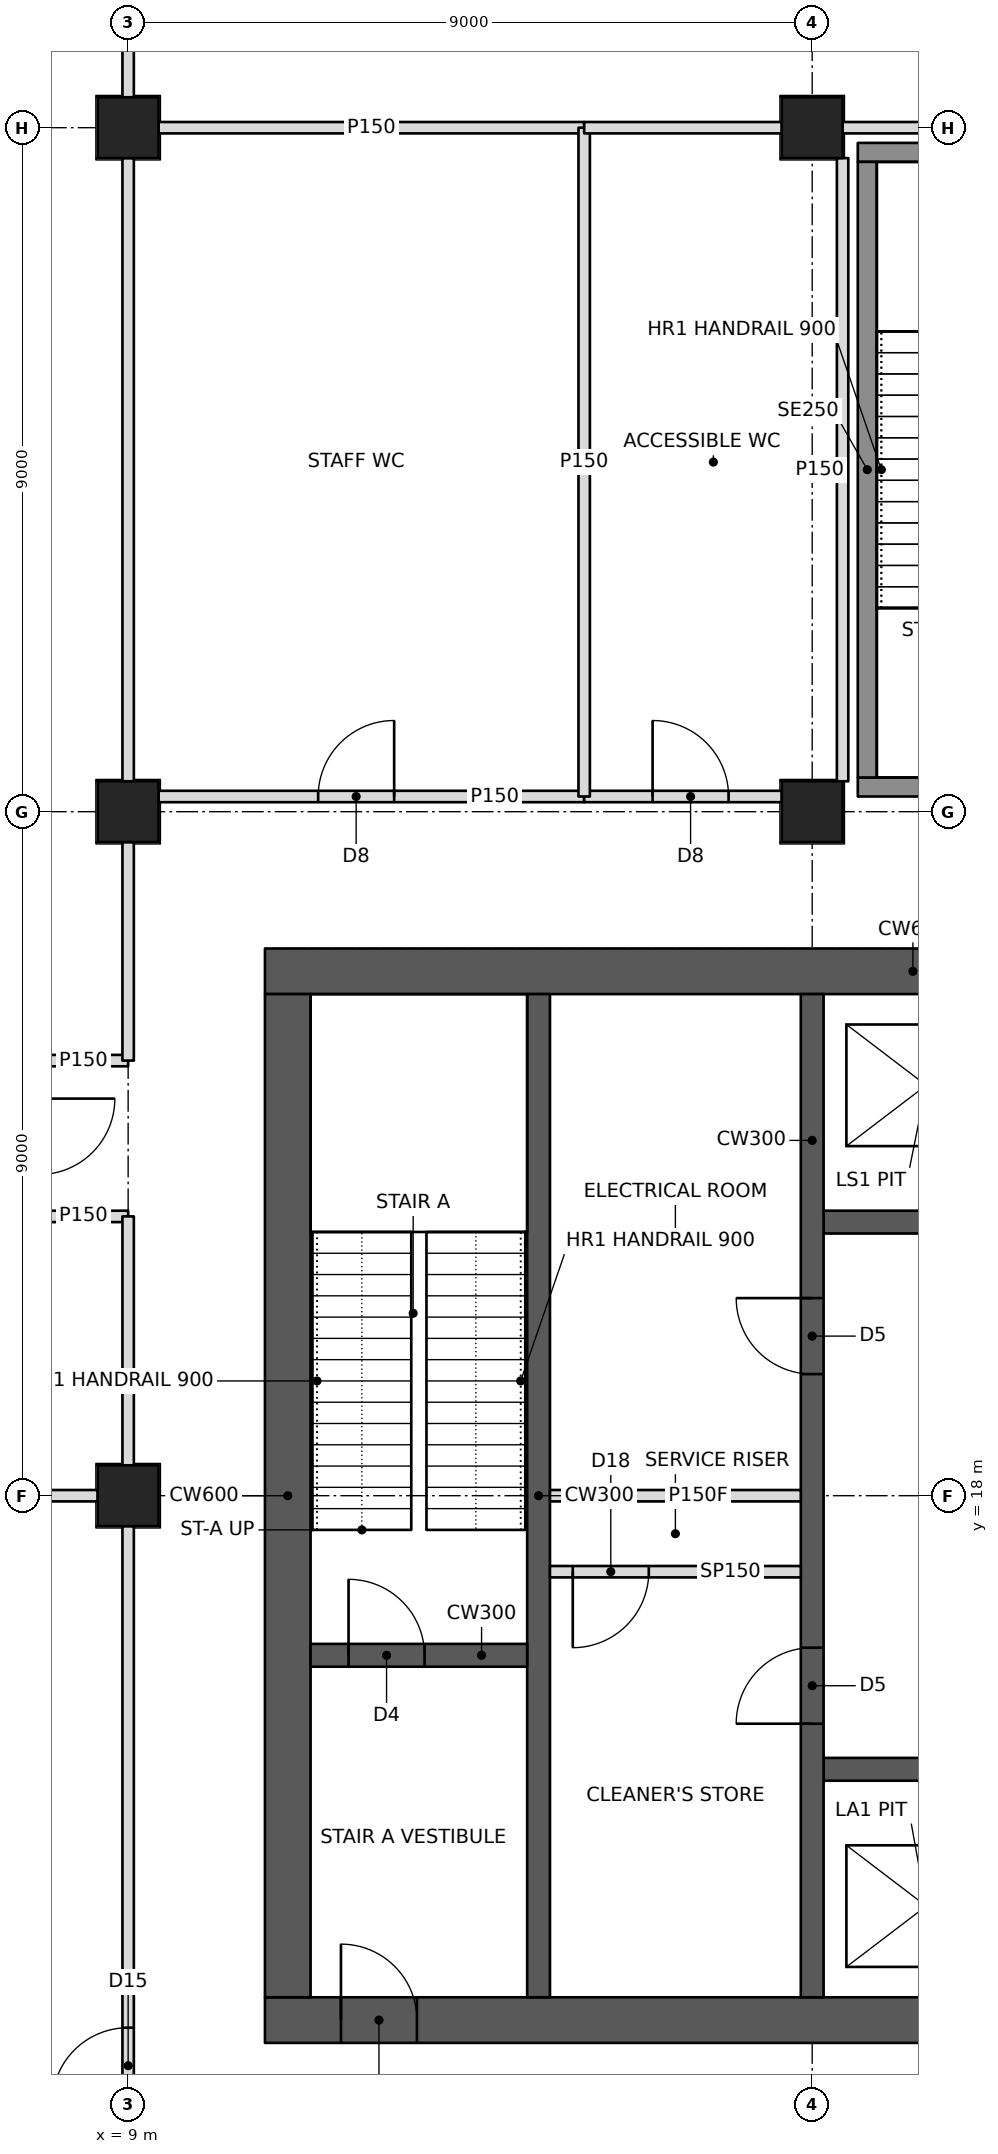
"""IFC4 building model, lengths in metres.
Left out: names, types, materials, properties, quantities, classifications, styles, units other than length and angle.
Written with IfcOpenShell. Run it as: python <this file> out.ifc"""

import sys

from ifc_helpers import new_model, si_unit, direction, frame, frame_2d, origin, origin_2d, place, context, subcontext, project, spatial, rectangle, hollow_rectangle, extrude, element, fill, save


model = new_model("IFC4")
c1 = context("Model", 3, precision=1e-05, world=origin(), true_north=direction((0.0, 1.0)))
c2 = subcontext(c1, "Body", "Model", "MODEL_VIEW")
j1 = project(units=[si_unit("LENGTHUNIT", "METRE"), si_unit("PLANEANGLEUNIT", "RADIAN")], contexts=[c1])
p1 = place(None, origin())
s1 = spatial("IfcSite", under=j1, at=p1, CompositionType="ELEMENT")
p2 = place(p1, origin())
s2 = spatial("IfcBuilding", under=s1, at=p2, CompositionType="ELEMENT")
p3 = place(p2, frame((0.0, 0.0, -10.5)))
s3 = spatial("IfcBuildingStorey", under=s2, at=p3, CompositionType="ELEMENT", Elevation=-10.5)
for number, where, z_axis, x_axis in (
    (1, (9.0, 18.0, -0.5), (0.0, 0.0, 1.0), (1.0, 0.0, 0.0)),
    (2, (9.0, 27.0, -0.5), (0.0, 0.0, 1.0), (1.0, 0.0, 0.0)),
    (3, (9.0, 36.0, -0.5), (0.0, 0.0, 1.0), (1.0, 0.0, 0.0)),
    (4, (18.0, 27.0, -0.5), (0.0, 0.0, 1.0), (1.0, 0.0, 0.0)),
    (5, (18.0, 36.0, -0.5), (0.0, 0.0, 1.0), (1.0, 0.0, 0.0)),
):
    element("IfcColumn", number, at=place(p3, frame(where, z_axis=z_axis, x_axis=x_axis)), inside=s3, PredefinedType="COLUMN", context=c2, shape_type="SweptSolid", body=[
        extrude(hollow_rectangle(XDim=0.8, YDim=0.8, WallThickness=0.1, at=origin_2d()), origin(), (0.0, 0.0, 1.0), 5.5),
    ])
p4 = place(p3, frame((10.8, 11.1, -0.5), z_axis=(0.0, 0.0, 1.0), x_axis=(1.0, 0.0, 0.0)))
e6 = element("IfcWall", 6, at=p4, inside=s3, PredefinedType="SHEAR", context=c2, shape_type="SweptSolid", body=[
    extrude(rectangle(XDim=23.4, YDim=0.6, at=frame_2d((11.7, 0.0))), origin(), (0.0, 0.0, 1.0), 5.5),
])
p5 = place(p4, frame((1.0, 0.0, 0.5)))
e7 = element("IfcOpeningElement", 7, at=p5, cuts=e6, PredefinedType="OPENING", context=c2, shape_type="SweptSolid", body=[
    extrude(rectangle(XDim=1.0, YDim=2.1, at=frame_2d((0.5, 1.05))), frame((0.0, 0.31, 0.0), z_axis=(0.0, -1.0, 0.0), x_axis=(1.0, 0.0, 0.0)), (0.0, 0.0, 1.0), 0.62),
])
p6 = place(p4, frame((17.2, 0.0, 0.5)))
e8 = element("IfcOpeningElement", 8, at=p6, cuts=e6, PredefinedType="OPENING", context=c2, shape_type="SweptSolid", body=[
    extrude(rectangle(XDim=1.8, YDim=2.1, at=frame_2d((0.9, 1.05))), frame((0.0, 0.31, 0.0), z_axis=(0.0, -1.0, 0.0), x_axis=(1.0, 0.0, 0.0)), (0.0, 0.0, 1.0), 0.62),
])
p7 = place(p3, frame((10.8, 24.9, -0.5), z_axis=(0.0, 0.0, 1.0), x_axis=(1.0, 0.0, 0.0)))
e9 = element("IfcWall", 9, at=p7, inside=s3, PredefinedType="SHEAR", context=c2, shape_type="SweptSolid", body=[
    extrude(rectangle(XDim=23.4, YDim=0.6, at=frame_2d((11.7, 0.0))), origin(), (0.0, 0.0, 1.0), 5.5),
])
p8 = place(p7, frame((17.2, 0.0, 0.5)))
e10 = element("IfcOpeningElement", 10, at=p8, cuts=e9, PredefinedType="OPENING", context=c2, shape_type="SweptSolid", body=[
    extrude(rectangle(XDim=1.8, YDim=2.1, at=frame_2d((0.9, 1.05))), frame((0.0, 0.31, 0.0), z_axis=(0.0, -1.0, 0.0), x_axis=(1.0, 0.0, 0.0)), (0.0, 0.0, 1.0), 0.62),
])
p9 = place(p7, frame((21.1, 0.0, 0.5)))
e11 = element("IfcOpeningElement", 11, at=p9, cuts=e9, PredefinedType="OPENING", context=c2, shape_type="SweptSolid", body=[
    extrude(rectangle(XDim=1.0, YDim=2.1, at=frame_2d((0.5, 1.05))), frame((0.0, 0.31, 0.0), z_axis=(0.0, -1.0, 0.0), x_axis=(1.0, 0.0, 0.0)), (0.0, 0.0, 1.0), 0.62),
])
p10 = place(p3, frame((11.1, 11.4, -0.5), z_axis=(0.0, 0.0, 1.0), x_axis=(0.0, 1.0, 0.0)))
e12 = element("IfcWall", 12, at=p10, inside=s3, PredefinedType="SHEAR", context=c2, shape_type="SweptSolid", body=[
    extrude(rectangle(XDim=13.2, YDim=0.6, at=frame_2d((6.6, 0.0))), origin(), (0.0, 0.0, 1.0), 5.5),
])
p11 = place(p3, frame((14.4, 11.4, -0.5), z_axis=(0.0, 0.0, 1.0), x_axis=(0.0, 1.0, 0.0)))
e13 = element("IfcWall", 13, at=p11, inside=s3, PredefinedType="SHEAR", context=c2, shape_type="SweptSolid", body=[
    extrude(rectangle(XDim=13.2, YDim=0.3, at=frame_2d((6.6, 0.0))), origin(), (0.0, 0.0, 1.0), 5.5),
])
p12 = place(p3, frame((11.4, 15.9, -0.5), z_axis=(0.0, 0.0, 1.0), x_axis=(1.0, 0.0, 0.0)))
e14 = element("IfcWall", 14, at=p12, inside=s3, PredefinedType="SHEAR", context=c2, shape_type="SweptSolid", body=[
    extrude(rectangle(XDim=2.85, YDim=0.3, at=frame_2d((1.425, 0.0))), origin(), (0.0, 0.0, 1.0), 5.5),
])
p13 = place(p12, frame((0.5, 0.0, 0.5)))
e15 = element("IfcOpeningElement", 15, at=p13, cuts=e14, PredefinedType="OPENING", context=c2, shape_type="SweptSolid", body=[
    extrude(rectangle(XDim=1.0, YDim=2.1, at=frame_2d((0.5, 1.05))), frame((0.0, 0.16, 0.0), z_axis=(0.0, -1.0, 0.0), x_axis=(1.0, 0.0, 0.0)), (0.0, 0.0, 1.0), 0.32),
])
p14 = place(p3, frame((18.0, 11.4, -0.5), z_axis=(0.0, 0.0, 1.0), x_axis=(0.0, 1.0, 0.0)))
e16 = element("IfcWall", 16, at=p14, inside=s3, PredefinedType="SHEAR", context=c2, shape_type="SweptSolid", body=[
    extrude(rectangle(XDim=13.2, YDim=0.3, at=frame_2d((6.6, 0.0))), origin(), (0.0, 0.0, 1.0), 5.5),
])
p15 = place(p14, frame((3.6, 0.0, 0.5)))
e17 = element("IfcOpeningElement", 17, at=p15, cuts=e16, PredefinedType="OPENING", context=c2, shape_type="SweptSolid", body=[
    extrude(rectangle(XDim=1.0, YDim=2.1, at=frame_2d((0.5, 1.05))), frame((0.0, 0.16, 0.0), z_axis=(0.0, -1.0, 0.0), x_axis=(1.0, 0.0, 0.0)), (0.0, 0.0, 1.0), 0.32),
])
p16 = place(p14, frame((8.2, 0.0, 0.5)))
e18 = element("IfcOpeningElement", 18, at=p16, cuts=e16, PredefinedType="OPENING", context=c2, shape_type="SweptSolid", body=[
    extrude(rectangle(XDim=1.0, YDim=2.1, at=frame_2d((0.5, 1.05))), frame((0.0, 0.16, 0.0), z_axis=(0.0, -1.0, 0.0), x_axis=(1.0, 0.0, 0.0)), (0.0, 0.0, 1.0), 0.32),
])
p17 = place(p3, frame((14.55, 18.0, 0.0), z_axis=(0.0, 0.0, 1.0), x_axis=(1.0, 0.0, 0.0)))
e19 = element("IfcWall", 19, at=p17, inside=s3, PredefinedType="PARTITIONING", context=c2, shape_type="SweptSolid", body=[
    extrude(rectangle(XDim=3.3, YDim=0.15, at=frame_2d((1.65, 0.0))), origin(), (0.0, 0.0, 1.0), 4.7),
])
p18 = place(p3, frame((18.15, 14.4, -0.5), z_axis=(0.0, 0.0, 1.0), x_axis=(1.0, 0.0, 0.0)))
e20 = element("IfcWall", 20, at=p18, inside=s3, PredefinedType="SHEAR", context=c2, shape_type="SweptSolid", body=[
    extrude(rectangle(XDim=9.0, YDim=0.3, at=frame_2d((4.5, 0.0))), origin(), (0.0, 0.0, 1.0), 5.5),
])
p19 = place(p18, frame((6.75, 0.0, 0.5)))
e21 = element("IfcOpeningElement", 21, at=p19, cuts=e20, PredefinedType="OPENING", context=c2, shape_type="SweptSolid", body=[
    extrude(rectangle(XDim=1.2, YDim=2.1, at=frame_2d((0.6, 1.05))), frame((0.0, 0.16, 0.0), z_axis=(0.0, -1.0, 0.0), x_axis=(1.0, 0.0, 0.0)), (0.0, 0.0, 1.0), 0.32),
])
p20 = place(p3, frame((18.15, 21.6, -0.5), z_axis=(0.0, 0.0, 1.0), x_axis=(1.0, 0.0, 0.0)))
e22 = element("IfcWall", 22, at=p20, inside=s3, PredefinedType="SHEAR", context=c2, shape_type="SweptSolid", body=[
    extrude(rectangle(XDim=9.0, YDim=0.3, at=frame_2d((4.5, 0.0))), origin(), (0.0, 0.0, 1.0), 5.5),
])
p21 = place(p20, frame((6.75, 0.0, 0.5)))
e23 = element("IfcOpeningElement", 23, at=p21, cuts=e22, PredefinedType="OPENING", context=c2, shape_type="SweptSolid", body=[
    extrude(rectangle(XDim=1.2, YDim=2.1, at=frame_2d((0.6, 1.05))), frame((0.0, 0.16, 0.0), z_axis=(0.0, -1.0, 0.0), x_axis=(1.0, 0.0, 0.0)), (0.0, 0.0, 1.0), 0.32),
])
p22 = place(p3, frame((0.4, 18.0, 0.0), z_axis=(0.0, 0.0, 1.0), x_axis=(1.0, 0.0, 0.0)))
e24 = element("IfcWall", 24, at=p22, inside=s3, PredefinedType="PARTITIONING", context=c2, shape_type="SweptSolid", body=[
    extrude(rectangle(XDim=8.2, YDim=0.15, at=frame_2d((4.1, 0.0))), origin(), (0.0, 0.0, 1.0), 3.842),
])
p23 = place(p3, frame((9.0, 17.6, 0.0), z_axis=(0.0, 0.0, 1.0), x_axis=(0.0, -1.0, 0.0)))
e25 = element("IfcWall", 25, at=p23, inside=s3, PredefinedType="PARTITIONING", context=c2, shape_type="SweptSolid", body=[
    extrude(rectangle(XDim=8.2, YDim=0.15, at=frame_2d((4.1, 0.0))), origin(), (0.0, 0.0, 1.0), 3.842),
])
p24 = place(p23, frame((6.6, 0.0, 0.0)))
e26 = element("IfcOpeningElement", 26, at=p24, cuts=e25, PredefinedType="OPENING", context=c2, shape_type="SweptSolid", body=[
    extrude(rectangle(XDim=1.0, YDim=2.1, at=frame_2d((0.5, 1.05))), frame((0.0, 0.085, 0.0), z_axis=(0.0, -1.0, 0.0), x_axis=(1.0, 0.0, 0.0)), (0.0, 0.0, 1.0), 0.17),
])
p25 = place(p3, frame((9.0, 26.6, 0.0), z_axis=(0.0, 0.0, 1.0), x_axis=(0.0, -1.0, 0.0)))
e27 = element("IfcWall", 27, at=p25, inside=s3, PredefinedType="PARTITIONING", context=c2, shape_type="SweptSolid", body=[
    extrude(rectangle(XDim=2.875, YDim=0.15, at=frame_2d((1.438, 0.0))), origin(), (0.0, 0.0, 1.0), 3.842),
])
p26 = place(p3, frame((15.0, 27.2, 0.0), z_axis=(0.0, 0.0, 1.0), x_axis=(-1.0, 0.0, 0.0)))
e28 = element("IfcWall", 28, at=p26, inside=s3, PredefinedType="PARTITIONING", context=c2, shape_type="SweptSolid", body=[
    extrude(rectangle(XDim=5.6, YDim=0.15, at=frame_2d((2.8, 0.0))), origin(), (0.0, 0.0, 1.0), 3.842),
])
p27 = place(p26, frame((2.5, 0.0, 0.0)))
e29 = element("IfcOpeningElement", 29, at=p27, cuts=e28, PredefinedType="OPENING", context=c2, shape_type="SweptSolid", body=[
    extrude(rectangle(XDim=1.0, YDim=2.1, at=frame_2d((0.5, 1.05))), frame((0.0, 0.085, 0.0), z_axis=(0.0, -1.0, 0.0), x_axis=(1.0, 0.0, 0.0)), (0.0, 0.0, 1.0), 0.17),
])
p28 = place(p3, frame((9.0, 35.6, 0.0), z_axis=(0.0, 0.0, 1.0), x_axis=(0.0, -1.0, 0.0)))
e30 = element("IfcWall", 30, at=p28, inside=s3, PredefinedType="PARTITIONING", context=c2, shape_type="SweptSolid", body=[
    extrude(rectangle(XDim=8.2, YDim=0.15, at=frame_2d((4.1, 0.0))), origin(), (0.0, 0.0, 1.0), 3.842),
])
p29 = place(p3, frame((9.4, 36.0, 0.0), z_axis=(0.0, 0.0, 1.0), x_axis=(1.0, 0.0, 0.0)))
e31 = element("IfcWall", 31, at=p29, inside=s3, PredefinedType="PARTITIONING", context=c2, shape_type="SweptSolid", body=[
    extrude(rectangle(XDim=5.6, YDim=0.15, at=frame_2d((2.8, 0.0))), origin(), (0.0, 0.0, 1.0), 3.842),
])
p30 = place(p3, frame((9.0, 44.801, 0.0), z_axis=(0.0, 0.0, 1.0), x_axis=(0.0, -1.0, 0.0)))
e32 = element("IfcWall", 32, at=p30, inside=s3, PredefinedType="PARTITIONING", context=c2, shape_type="SweptSolid", body=[
    extrude(rectangle(XDim=8.401, YDim=0.15, at=frame_2d((4.2, 0.0))), origin(), (0.0, 0.0, 1.0), 3.842),
])
p31 = place(p3, frame((17.6, 27.2, 0.0), z_axis=(0.0, 0.0, 1.0), x_axis=(-1.0, 0.0, 0.0)))
e33 = element("IfcWall", 33, at=p31, inside=s3, PredefinedType="PARTITIONING", context=c2, shape_type="SweptSolid", body=[
    extrude(rectangle(XDim=2.6, YDim=0.15, at=frame_2d((1.3, 0.0))), origin(), (0.0, 0.0, 1.0), 3.842),
])
p32 = place(p31, frame((0.7, 0.0, 0.0)))
e34 = element("IfcOpeningElement", 34, at=p32, cuts=e33, PredefinedType="OPENING", context=c2, shape_type="SweptSolid", body=[
    extrude(rectangle(XDim=1.0, YDim=2.1, at=frame_2d((0.5, 1.05))), frame((0.0, 0.085, 0.0), z_axis=(0.0, -1.0, 0.0), x_axis=(1.0, 0.0, 0.0)), (0.0, 0.0, 1.0), 0.17),
])
p33 = place(p3, frame((15.0, 36.0, 0.0), z_axis=(0.0, 0.0, 1.0), x_axis=(0.0, -1.0, 0.0)))
e35 = element("IfcWall", 35, at=p33, inside=s3, PredefinedType="PARTITIONING", context=c2, shape_type="SweptSolid", body=[
    extrude(rectangle(XDim=8.8, YDim=0.15, at=frame_2d((4.4, 0.0))), origin(), (0.0, 0.0, 1.0), 3.841),
])
p34 = place(p3, frame((15.0, 36.0, 0.0), z_axis=(0.0, 0.0, 1.0), x_axis=(1.0, 0.0, 0.0)))
e36 = element("IfcWall", 36, at=p34, inside=s3, PredefinedType="PARTITIONING", context=c2, shape_type="SweptSolid", body=[
    extrude(rectangle(XDim=2.6, YDim=0.15, at=frame_2d((1.3, 0.0))), origin(), (0.0, 0.0, 1.0), 3.842),
])
p35 = place(p3, frame((18.4, 35.6, 0.0), z_axis=(0.0, 0.0, 1.0), x_axis=(0.0, -1.0, 0.0)))
e37 = element("IfcWall", 37, at=p35, inside=s3, PredefinedType="PARTITIONING", context=c2, shape_type="SweptSolid", body=[
    extrude(rectangle(XDim=8.2, YDim=0.15, at=frame_2d((4.1, 0.0))), origin(), (0.0, 0.0, 1.0), 4.7),
])
p36 = place(p3, frame((23.5, 36.0, 0.0), z_axis=(0.0, 0.0, 1.0), x_axis=(-1.0, 0.0, 0.0)))
e38 = element("IfcWall", 38, at=p36, inside=s3, PredefinedType="PARTITIONING", context=c2, shape_type="SweptSolid", body=[
    extrude(rectangle(XDim=5.1, YDim=0.15, at=frame_2d((2.55, 0.0))), origin(), (0.0, 0.0, 1.0), 3.842),
])
p37 = place(p3, frame((9.0, 21.675, 0.0), z_axis=(0.0, 0.0, 1.0), x_axis=(0.0, -1.0, 0.0)))
e39 = element("IfcWall", 39, at=p37, inside=s3, PredefinedType="PARTITIONING", context=c2, shape_type="SweptSolid", body=[
    extrude(rectangle(XDim=3.275, YDim=0.15, at=frame_2d((1.638, 0.0))), origin(), (0.0, 0.0, 1.0), 3.842),
])
for number, where, z_axis, x_axis in (
    (40, (9.0, 23.725, 0.0), (0.0, 0.0, 1.0), (-1.0, 0.0, 0.0)),
    (41, (9.0, 21.675, 0.0), (0.0, 0.0, 1.0), (-1.0, 0.0, 0.0)),
):
    element("IfcWall", number, at=place(p3, frame(where, z_axis=z_axis, x_axis=x_axis)), inside=s3, PredefinedType="PARTITIONING", context=c2, shape_type="SweptSolid", body=[
        extrude(rectangle(XDim=1.175, YDim=0.15, at=frame_2d((0.587, 0.0))), origin(), (0.0, 0.0, 1.0), 3.841),
    ])
p38 = place(p3, frame((14.55, 17.0, 0.0), z_axis=(0.0, 0.0, 1.0), x_axis=(1.0, 0.0, 0.0)))
e42 = element("IfcWall", 42, at=p38, inside=s3, PredefinedType="PARTITIONING", context=c2, shape_type="SweptSolid", body=[
    extrude(rectangle(XDim=3.3, YDim=0.15, at=frame_2d((1.65, 0.0))), origin(), (0.0, 0.0, 1.0), 4.7),
])
p39 = place(p38, frame((0.3, 0.0, 0.0)))
e43 = element("IfcOpeningElement", 43, at=p39, cuts=e42, PredefinedType="OPENING", context=c2, shape_type="SweptSolid", body=[
    extrude(rectangle(XDim=1.0, YDim=2.1, at=frame_2d((0.5, 1.05))), frame((0.0, 0.085, 0.0), z_axis=(0.0, -1.0, 0.0), x_axis=(1.0, 0.0, 0.0)), (0.0, 0.0, 1.0), 0.17),
])
for number, where, z_axis, x_axis in (
    (44, (18.6, 27.325, 0.0), (0.0, 0.0, 1.0), (1.0, 0.0, 0.0)),
    (45, (18.6, 35.675, 0.0), (0.0, 0.0, 1.0), (1.0, 0.0, 0.0)),
):
    element("IfcWall", number, at=place(p3, frame(where, z_axis=z_axis, x_axis=x_axis)), inside=s3, PredefinedType="SOLIDWALL", context=c2, shape_type="SweptSolid", body=[
        extrude(rectangle(XDim=4.9, YDim=0.25, at=frame_2d((2.45, 0.0))), origin(), (0.0, 0.0, 1.0), 4.7),
    ])
p40 = place(p3, frame((18.725, 27.45, 0.0), z_axis=(0.0, 0.0, 1.0), x_axis=(0.0, 1.0, 0.0)))
e46 = element("IfcWall", 46, at=p40, inside=s3, PredefinedType="SOLIDWALL", context=c2, shape_type="SweptSolid", body=[
    extrude(rectangle(XDim=8.1, YDim=0.25, at=frame_2d((4.05, 0.0))), origin(), (0.0, 0.0, 1.0), 4.7),
])
p41 = place(p24, frame((1.0, 0.0, 0.0), z_axis=(0.0, 0.0, 1.0), x_axis=(-1.0, 0.0, 0.0)))
e47 = element("IfcDoor", 47, at=p41, inside=s3, OperationType="SINGLE_SWING_LEFT", PredefinedType="DOOR", context=c2, shape_type="SweptSolid", body=[
    extrude(rectangle(XDim=1.0, YDim=2.1, at=frame_2d((0.5, 1.05))), frame((0.0, 0.025, 0.0), z_axis=(0.0, -1.0, 0.0), x_axis=(1.0, 0.0, 0.0)), (0.0, 0.0, 1.0), 0.05),
])
fill(e26, e47)
p42 = place(p27, frame((1.0, 0.0, 0.0), z_axis=(0.0, 0.0, 1.0), x_axis=(-1.0, 0.0, 0.0)))
e48 = element("IfcDoor", 48, at=p42, inside=s3, OperationType="SINGLE_SWING_RIGHT", PredefinedType="DOOR", context=c2, shape_type="SweptSolid", body=[
    extrude(rectangle(XDim=1.0, YDim=2.1, at=frame_2d((0.5, 1.05))), frame((0.0, 0.025, 0.0), z_axis=(0.0, -1.0, 0.0), x_axis=(1.0, 0.0, 0.0)), (0.0, 0.0, 1.0), 0.05),
])
fill(e29, e48)
p43 = place(p32, frame((1.0, 0.0, 0.0), z_axis=(0.0, 0.0, 1.0), x_axis=(-1.0, 0.0, 0.0)))
e49 = element("IfcDoor", 49, at=p43, inside=s3, OperationType="SINGLE_SWING_LEFT", PredefinedType="DOOR", context=c2, shape_type="SweptSolid", body=[
    extrude(rectangle(XDim=1.0, YDim=2.1, at=frame_2d((0.5, 1.05))), frame((0.0, 0.025, 0.0), z_axis=(0.0, -1.0, 0.0), x_axis=(1.0, 0.0, 0.0)), (0.0, 0.0, 1.0), 0.05),
])
fill(e34, e49)
p44 = place(p39, frame((1.0, 0.0, 0.0), z_axis=(0.0, 0.0, 1.0), x_axis=(-1.0, 0.0, 0.0)))
e50 = element("IfcDoor", 50, at=p44, inside=s3, OperationType="SINGLE_SWING_RIGHT", PredefinedType="DOOR", context=c2, shape_type="SweptSolid", body=[
    extrude(rectangle(XDim=1.0, YDim=2.1, at=frame_2d((0.5, 1.05))), frame((0.0, 0.025, 0.0), z_axis=(0.0, -1.0, 0.0), x_axis=(1.0, 0.0, 0.0)), (0.0, 0.0, 1.0), 0.05),
])
fill(e43, e50)
p45 = place(p5, origin())
e51 = element("IfcDoor", 51, at=p45, inside=s3, OperationType="SINGLE_SWING_LEFT", PredefinedType="DOOR", context=c2, shape_type="SweptSolid", body=[
    extrude(rectangle(XDim=1.0, YDim=2.1, at=frame_2d((0.5, 1.05))), frame((0.0, 0.025, 0.0), z_axis=(0.0, -1.0, 0.0), x_axis=(1.0, 0.0, 0.0)), (0.0, 0.0, 1.0), 0.05),
])
fill(e7, e51)
p46 = place(p13, origin())
e52 = element("IfcDoor", 52, at=p46, inside=s3, OperationType="SINGLE_SWING_LEFT", PredefinedType="DOOR", context=c2, shape_type="SweptSolid", body=[
    extrude(rectangle(XDim=1.0, YDim=2.1, at=frame_2d((0.5, 1.05))), frame((0.0, 0.025, 0.0), z_axis=(0.0, -1.0, 0.0), x_axis=(1.0, 0.0, 0.0)), (0.0, 0.0, 1.0), 0.05),
])
fill(e15, e52)
p47 = place(p15, origin())
e53 = element("IfcDoor", 53, at=p47, inside=s3, OperationType="SINGLE_SWING_LEFT", PredefinedType="DOOR", context=c2, shape_type="SweptSolid", body=[
    extrude(rectangle(XDim=1.0, YDim=2.1, at=frame_2d((0.5, 1.05))), frame((0.0, 0.025, 0.0), z_axis=(0.0, -1.0, 0.0), x_axis=(1.0, 0.0, 0.0)), (0.0, 0.0, 1.0), 0.05),
])
fill(e17, e53)
p48 = place(p16, origin())
e54 = element("IfcDoor", 54, at=p48, inside=s3, OperationType="SINGLE_SWING_RIGHT", PredefinedType="DOOR", context=c2, shape_type="SweptSolid", body=[
    extrude(rectangle(XDim=1.0, YDim=2.1, at=frame_2d((0.5, 1.05))), frame((0.0, 0.025, 0.0), z_axis=(0.0, -1.0, 0.0), x_axis=(1.0, 0.0, 0.0)), (0.0, 0.0, 1.0), 0.05),
])
fill(e18, e54)
save(model, sys.argv[1])
